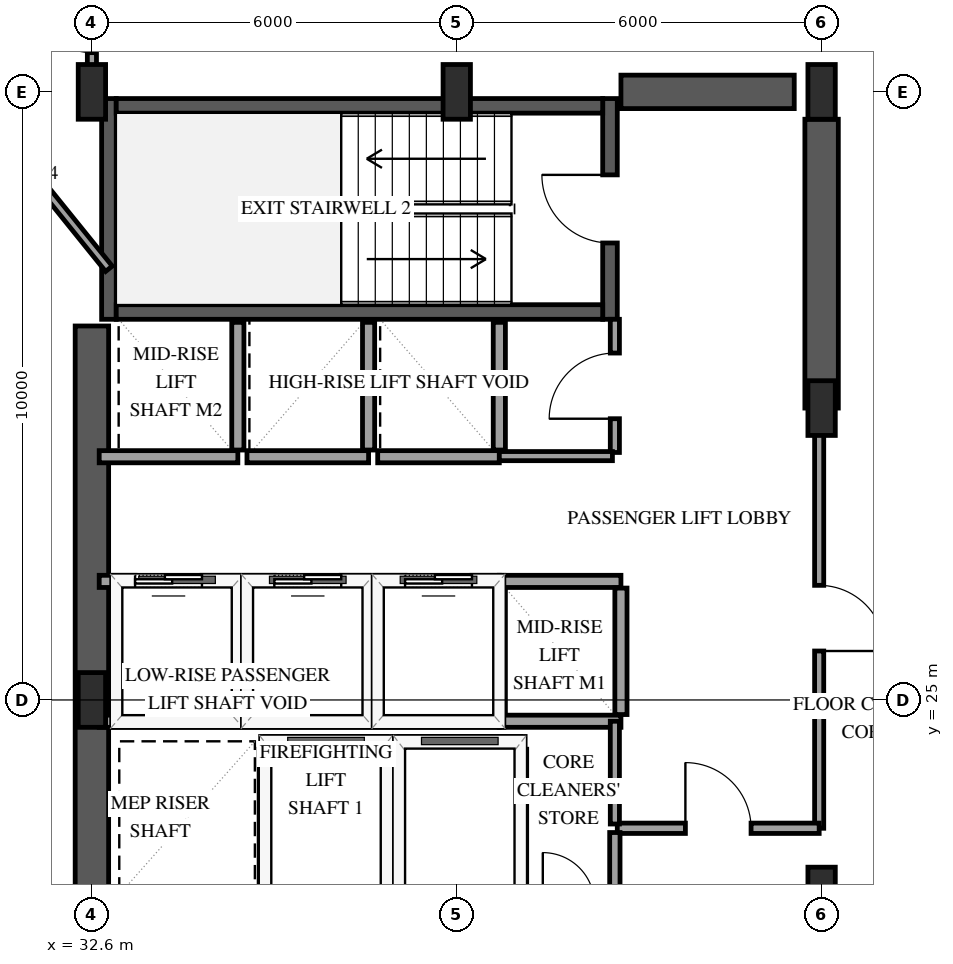
"""IFC4 building model, lengths in metres.
Left out: names, types, materials, properties, quantities, classifications, styles, units other than length and angle.
Written with IfcOpenShell. Run it as: python <this file> out.ifc"""

import sys

from ifc_helpers import new_model, si_unit, direction, frame, frame_2d, origin, origin_2d, place, context, subcontext, project, spatial, rectangle, extrude, element, fill, save


model = new_model("IFC4")
c1 = context("Model", 3, precision=1e-05, world=origin(), true_north=direction((0.0, 1.0)))
c2 = subcontext(c1, "Body", "Model", "MODEL_VIEW")
j1 = project(units=[si_unit("LENGTHUNIT", "METRE"), si_unit("PLANEANGLEUNIT", "RADIAN")], contexts=[c1])
p1 = place(None, origin())
s1 = spatial("IfcSite", under=j1, at=p1, CompositionType="ELEMENT")
p2 = place(p1, origin())
s2 = spatial("IfcBuilding", under=s1, at=p2, CompositionType="ELEMENT")
p3 = place(p2, frame((0.0, 0.0, 130.3)))
s3 = spatial("IfcBuildingStorey", under=s2, at=p3, CompositionType="ELEMENT", Elevation=130.3)
p4 = place(p3, frame((32.88, 31.26, 0.0), z_axis=(0.0, 0.0, 1.0), x_axis=(0.0, 1.0, 0.0)))
e1 = element("IfcWall", 1, at=p4, inside=s3, PredefinedType="SHEAR", context=c2, shape_type="SweptSolid", body=[
    extrude(rectangle(XDim=3.63, YDim=0.24, at=frame_2d((1.815, 0.0))), origin(), (0.0, 0.0, 1.0), 3.9),
])
p5 = place(p3, frame((41.12, 31.26, 0.0), z_axis=(0.0, 0.0, 1.0), x_axis=(0.0, 1.0, 0.0)))
e2 = element("IfcWall", 2, at=p5, inside=s3, PredefinedType="SHEAR", context=c2, shape_type="SweptSolid", body=[
    extrude(rectangle(XDim=3.63, YDim=0.24, at=frame_2d((1.815, 0.0))), origin(), (0.0, 0.0, 1.0), 3.9),
])
p6 = place(p5, frame((1.255, 0.0, 0.0)))
e3 = element("IfcOpeningElement", 3, at=p6, cuts=e2, PredefinedType="OPENING", context=c2, shape_type="SweptSolid", body=[
    extrude(rectangle(XDim=1.12, YDim=2.15, at=frame_2d((0.56, 1.075))), frame((0.0, 0.13, 0.0), z_axis=(0.0, -1.0, 0.0), x_axis=(1.0, 0.0, 0.0)), (0.0, 0.0, 1.0), 0.26),
])
for number, where, z_axis, x_axis in (
    (4, (33.0, 31.38, 0.0), (0.0, 0.0, 1.0), (1.0, 0.0, 0.0)),
    (5, (33.0, 34.77, 0.0), (0.0, 0.0, 1.0), (1.0, 0.0, 0.0)),
):
    element("IfcWall", number, at=place(p3, frame(where, z_axis=z_axis, x_axis=x_axis)), inside=s3, PredefinedType="SHEAR", context=c2, shape_type="SweptSolid", body=[
        extrude(rectangle(XDim=8.0, YDim=0.24, at=frame_2d((4.0, 0.0))), origin(), (0.0, 0.0, 1.0), 3.9),
    ])
p7 = place(p3, frame((32.6, 18.85, 0.0), z_axis=(0.0, 0.0, 1.0), x_axis=(0.0, 1.0, 0.0)))
e6 = element("IfcWall", 6, at=p7, inside=s3, PredefinedType="SHEAR", context=c2, shape_type="SweptSolid", body=[
    extrude(rectangle(XDim=12.3, YDim=0.55, at=frame_2d((6.15, 0.0))), origin(), (0.0, 0.0, 1.0), 3.9),
])
p8 = place(p3, frame((41.3, 35.0, 0.0), z_axis=(0.0, 0.0, 1.0), x_axis=(1.0, 0.0, 0.0)))
e7 = element("IfcWall", 7, at=p8, inside=s3, PredefinedType="SHEAR", context=c2, shape_type="SweptSolid", body=[
    extrude(rectangle(XDim=2.85, YDim=0.55, at=frame_2d((1.425, 0.0))), origin(), (0.0, 0.0, 1.0), 3.9),
])
p9 = place(p3, frame((44.6, 29.8, 0.0), z_axis=(0.0, 0.0, 1.0), x_axis=(0.0, 1.0, 0.0)))
e8 = element("IfcWall", 8, at=p9, inside=s3, PredefinedType="SHEAR", context=c2, shape_type="SweptSolid", body=[
    extrude(rectangle(XDim=4.75, YDim=0.55, at=frame_2d((2.375, 0.0))), origin(), (0.0, 0.0, 1.0), 3.9),
])
for number, where, z_axis, x_axis in (
    (9, (32.6, 25.0, 0.0), (0.0, 0.0, 1.0), (1.0, 0.0, 0.0)),
    (10, (32.6, 35.0, 0.0), (0.0, 0.0, 1.0), (1.0, 0.0, 0.0)),
    (11, (38.6, 35.0, 0.0), (0.0, 0.0, 1.0), (1.0, 0.0, 0.0)),
    (12, (44.6, 21.8, 0.0), (0.0, 0.0, 1.0), (1.0, 0.0, 0.0)),
    (13, (44.6, 29.8, 0.0), (0.0, 0.0, 1.0), (1.0, 0.0, 0.0)),
    (14, (44.6, 35.0, 0.0), (0.0, 0.0, 1.0), (1.0, 0.0, 0.0)),
):
    element("IfcColumn", number, at=place(p3, frame(where, z_axis=z_axis, x_axis=x_axis)), inside=s3, PredefinedType="PILASTER", context=c2, shape_type="SweptSolid", body=[
        extrude(rectangle(XDim=0.45, YDim=0.9, at=origin_2d()), origin(), (0.0, 0.0, 1.0), 3.9),
    ])
p10 = place(p3, frame((35.45, 24.3, 0.0), z_axis=(0.0, 0.0, 1.0), x_axis=(1.0, 0.0, 0.0)))
e15 = element("IfcWall", 15, at=p10, inside=s3, PredefinedType="SOLIDWALL", context=c2, shape_type="SweptSolid", body=[
    extrude(rectangle(XDim=2.0, YDim=0.2, at=frame_2d((1.0, 0.0))), origin(), (0.0, 0.0, 1.0), 3.56),
])
for number, where, z_axis, x_axis in (
    (16, (35.45, 21.81, 0.0), (0.0, 0.0, 1.0), (0.0, 1.0, 0.0)),
    (17, (37.45, 21.81, 0.0), (0.0, 0.0, 1.0), (0.0, 1.0, 0.0)),
):
    element("IfcWall", number, at=place(p3, frame(where, z_axis=z_axis, x_axis=x_axis)), inside=s3, PredefinedType="SOLIDWALL", context=c2, shape_type="SweptSolid", body=[
        extrude(rectangle(XDim=2.38, YDim=0.2, at=frame_2d((1.19, 0.0))), origin(), (0.0, 0.0, 1.0), 3.56),
    ])
p11 = place(p3, frame((37.65, 24.3, 0.0), z_axis=(0.0, 0.0, 1.0), x_axis=(1.0, 0.0, 0.0)))
e18 = element("IfcWall", 18, at=p11, inside=s3, PredefinedType="SOLIDWALL", context=c2, shape_type="SweptSolid", body=[
    extrude(rectangle(XDim=2.0, YDim=0.2, at=frame_2d((1.0, 0.0))), origin(), (0.0, 0.0, 1.0), 3.56),
])
p12 = place(p3, frame((39.65, 21.81, 0.0), z_axis=(0.0, 0.0, 1.0), x_axis=(0.0, 1.0, 0.0)))
e19 = element("IfcWall", 19, at=p12, inside=s3, PredefinedType="SOLIDWALL", context=c2, shape_type="SweptSolid", body=[
    extrude(rectangle(XDim=2.38, YDim=0.2, at=frame_2d((1.19, 0.0))), origin(), (0.0, 0.0, 1.0), 3.56),
])
p13 = place(p3, frame((32.72, 24.65, 0.0), z_axis=(0.0, 0.0, 1.0), x_axis=(1.0, 0.0, 0.0)))
e20 = element("IfcWall", 20, at=p13, inside=s3, PredefinedType="SOLIDWALL", context=c2, shape_type="SweptSolid", body=[
    extrude(rectangle(XDim=2.28, YDim=0.2, at=frame_2d((1.14, 0.0))), origin(), (0.0, 0.0, 1.0), 3.56),
])
p14 = place(p3, frame((32.72, 26.95, 0.0), z_axis=(0.0, 0.0, 1.0), x_axis=(1.0, 0.0, 0.0)))
e21 = element("IfcWall", 21, at=p14, inside=s3, PredefinedType="SOLIDWALL", context=c2, shape_type="SweptSolid", body=[
    extrude(rectangle(XDim=2.28, YDim=0.2, at=frame_2d((1.14, 0.0))), origin(), (0.0, 0.0, 1.0), 3.56),
])
p15 = place(p14, frame((0.59, 0.0, 0.0)))
e22 = element("IfcOpeningElement", 22, at=p15, cuts=e21, PredefinedType="OPENING", context=c2, shape_type="SweptSolid", body=[
    extrude(rectangle(XDim=1.1, YDim=2.15, at=frame_2d((0.55, 1.075))), frame((0.0, 0.11, 0.0), z_axis=(0.0, -1.0, 0.0), x_axis=(1.0, 0.0, 0.0)), (0.0, 0.0, 1.0), 0.22),
])
p16 = place(p3, frame((35.0, 24.76, 0.0), z_axis=(0.0, 0.0, 1.0), x_axis=(0.0, 1.0, 0.0)))
e23 = element("IfcWall", 23, at=p16, inside=s3, PredefinedType="SOLIDWALL", context=c2, shape_type="SweptSolid", body=[
    extrude(rectangle(XDim=2.08, YDim=0.2, at=frame_2d((1.04, 0.0))), origin(), (0.0, 0.0, 1.0), 3.56),
])
p17 = place(p3, frame((35.15, 24.65, 0.0), z_axis=(0.0, 0.0, 1.0), x_axis=(1.0, 0.0, 0.0)))
e24 = element("IfcWall", 24, at=p17, inside=s3, PredefinedType="SOLIDWALL", context=c2, shape_type="SweptSolid", body=[
    extrude(rectangle(XDim=2.0, YDim=0.2, at=frame_2d((1.0, 0.0))), origin(), (0.0, 0.0, 1.0), 3.56),
])
p18 = place(p3, frame((35.15, 26.95, 0.0), z_axis=(0.0, 0.0, 1.0), x_axis=(1.0, 0.0, 0.0)))
e25 = element("IfcWall", 25, at=p18, inside=s3, PredefinedType="SOLIDWALL", context=c2, shape_type="SweptSolid", body=[
    extrude(rectangle(XDim=2.0, YDim=0.2, at=frame_2d((1.0, 0.0))), origin(), (0.0, 0.0, 1.0), 3.56),
])
p19 = place(p18, frame((0.45, 0.0, 0.0)))
e26 = element("IfcOpeningElement", 26, at=p19, cuts=e25, PredefinedType="OPENING", context=c2, shape_type="SweptSolid", body=[
    extrude(rectangle(XDim=1.1, YDim=2.15, at=frame_2d((0.55, 1.075))), frame((0.0, 0.11, 0.0), z_axis=(0.0, -1.0, 0.0), x_axis=(1.0, 0.0, 0.0)), (0.0, 0.0, 1.0), 0.22),
])
p20 = place(p3, frame((37.15, 24.76, 0.0), z_axis=(0.0, 0.0, 1.0), x_axis=(0.0, 1.0, 0.0)))
e27 = element("IfcWall", 27, at=p20, inside=s3, PredefinedType="SOLIDWALL", context=c2, shape_type="SweptSolid", body=[
    extrude(rectangle(XDim=2.08, YDim=0.2, at=frame_2d((1.04, 0.0))), origin(), (0.0, 0.0, 1.0), 3.56),
])
p21 = place(p3, frame((37.3, 24.65, 0.0), z_axis=(0.0, 0.0, 1.0), x_axis=(1.0, 0.0, 0.0)))
e28 = element("IfcWall", 28, at=p21, inside=s3, PredefinedType="SOLIDWALL", context=c2, shape_type="SweptSolid", body=[
    extrude(rectangle(XDim=2.0, YDim=0.2, at=frame_2d((1.0, 0.0))), origin(), (0.0, 0.0, 1.0), 3.56),
])
p22 = place(p3, frame((37.3, 26.95, 0.0), z_axis=(0.0, 0.0, 1.0), x_axis=(1.0, 0.0, 0.0)))
e29 = element("IfcWall", 29, at=p22, inside=s3, PredefinedType="SOLIDWALL", context=c2, shape_type="SweptSolid", body=[
    extrude(rectangle(XDim=2.0, YDim=0.2, at=frame_2d((1.0, 0.0))), origin(), (0.0, 0.0, 1.0), 3.56),
])
p23 = place(p22, frame((0.45, 0.0, 0.0)))
e30 = element("IfcOpeningElement", 30, at=p23, cuts=e29, PredefinedType="OPENING", context=c2, shape_type="SweptSolid", body=[
    extrude(rectangle(XDim=1.1, YDim=2.15, at=frame_2d((0.55, 1.075))), frame((0.0, 0.11, 0.0), z_axis=(0.0, -1.0, 0.0), x_axis=(1.0, 0.0, 0.0)), (0.0, 0.0, 1.0), 0.22),
])
p24 = place(p3, frame((39.3, 24.76, 0.0), z_axis=(0.0, 0.0, 1.0), x_axis=(0.0, 1.0, 0.0)))
e31 = element("IfcWall", 31, at=p24, inside=s3, PredefinedType="SOLIDWALL", context=c2, shape_type="SweptSolid", body=[
    extrude(rectangle(XDim=2.08, YDim=0.2, at=frame_2d((1.04, 0.0))), origin(), (0.0, 0.0, 1.0), 3.56),
])
for number, where, z_axis, x_axis in (
    (32, (39.3, 24.65, 0.0), (0.0, 0.0, 1.0), (1.0, 0.0, 0.0)),
    (33, (39.3, 26.95, 0.0), (0.0, 0.0, 1.0), (1.0, 0.0, 0.0)),
):
    element("IfcWall", number, at=place(p3, frame(where, z_axis=z_axis, x_axis=x_axis)), inside=s3, PredefinedType="SOLIDWALL", context=c2, shape_type="SweptSolid", body=[
        extrude(rectangle(XDim=2.0, YDim=0.2, at=frame_2d((1.0, 0.0))), origin(), (0.0, 0.0, 1.0), 3.56),
    ])
p25 = place(p3, frame((41.3, 24.76, 0.0), z_axis=(0.0, 0.0, 1.0), x_axis=(0.0, 1.0, 0.0)))
e34 = element("IfcWall", 34, at=p25, inside=s3, PredefinedType="SOLIDWALL", context=c2, shape_type="SweptSolid", body=[
    extrude(rectangle(XDim=2.08, YDim=0.2, at=frame_2d((1.04, 0.0))), origin(), (0.0, 0.0, 1.0), 3.56),
])
p26 = place(p3, frame((32.72, 29.0, 0.0), z_axis=(0.0, 0.0, 1.0), x_axis=(1.0, 0.0, 0.0)))
e35 = element("IfcWall", 35, at=p26, inside=s3, PredefinedType="SOLIDWALL", context=c2, shape_type="SweptSolid", body=[
    extrude(rectangle(XDim=2.28, YDim=0.2, at=frame_2d((1.14, 0.0))), origin(), (0.0, 0.0, 1.0), 3.56),
])
p27 = place(p3, frame((35.0, 29.11, 0.0), z_axis=(0.0, 0.0, 1.0), x_axis=(0.0, 1.0, 0.0)))
e36 = element("IfcWall", 36, at=p27, inside=s3, PredefinedType="SOLIDWALL", context=c2, shape_type="SweptSolid", body=[
    extrude(rectangle(XDim=2.1, YDim=0.2, at=frame_2d((1.05, 0.0))), origin(), (0.0, 0.0, 1.0), 3.56),
])
p28 = place(p3, frame((35.15, 29.0, 0.0), z_axis=(0.0, 0.0, 1.0), x_axis=(1.0, 0.0, 0.0)))
e37 = element("IfcWall", 37, at=p28, inside=s3, PredefinedType="SOLIDWALL", context=c2, shape_type="SweptSolid", body=[
    extrude(rectangle(XDim=2.0, YDim=0.2, at=frame_2d((1.0, 0.0))), origin(), (0.0, 0.0, 1.0), 3.56),
])
p29 = place(p3, frame((37.15, 29.11, 0.0), z_axis=(0.0, 0.0, 1.0), x_axis=(0.0, 1.0, 0.0)))
e38 = element("IfcWall", 38, at=p29, inside=s3, PredefinedType="SOLIDWALL", context=c2, shape_type="SweptSolid", body=[
    extrude(rectangle(XDim=2.1, YDim=0.2, at=frame_2d((1.05, 0.0))), origin(), (0.0, 0.0, 1.0), 3.56),
])
p30 = place(p3, frame((37.3, 29.0, 0.0), z_axis=(0.0, 0.0, 1.0), x_axis=(1.0, 0.0, 0.0)))
e39 = element("IfcWall", 39, at=p30, inside=s3, PredefinedType="SOLIDWALL", context=c2, shape_type="SweptSolid", body=[
    extrude(rectangle(XDim=2.0, YDim=0.2, at=frame_2d((1.0, 0.0))), origin(), (0.0, 0.0, 1.0), 3.56),
])
p31 = place(p3, frame((39.3, 29.11, 0.0), z_axis=(0.0, 0.0, 1.0), x_axis=(0.0, 1.0, 0.0)))
e40 = element("IfcWall", 40, at=p31, inside=s3, PredefinedType="SOLIDWALL", context=c2, shape_type="SweptSolid", body=[
    extrude(rectangle(XDim=2.1, YDim=0.2, at=frame_2d((1.05, 0.0))), origin(), (0.0, 0.0, 1.0), 3.56),
])
p32 = place(p3, frame((44.56, 29.8, 0.0), z_axis=(0.0, 0.0, 1.0), x_axis=(0.0, -1.0, 0.0)))
e41 = element("IfcWall", 41, at=p32, inside=s3, PredefinedType="PARTITIONING", context=c2, shape_type="SweptSolid", body=[
    extrude(rectangle(XDim=6.91, YDim=0.15, at=frame_2d((3.455, 0.0))), origin(), (0.0, 0.0, 1.0), 2.6),
])
p33 = place(p32, frame((2.915, 0.0, 0.0)))
e42 = element("IfcOpeningElement", 42, at=p33, cuts=e41, PredefinedType="OPENING", context=c2, shape_type="SweptSolid", body=[
    extrude(rectangle(XDim=1.08, YDim=2.15, at=frame_2d((0.54, 1.075))), frame((0.0, 0.085, 0.0), z_axis=(0.0, -1.0, 0.0), x_axis=(1.0, 0.0, 0.0)), (0.0, 0.0, 1.0), 0.17),
])
p34 = place(p3, frame((32.88, 32.091, 0.0), z_axis=(0.0, 0.0, 1.0), x_axis=(-0.627971930716, 0.77823598878, 0.0)))
e43 = element("IfcWall", 43, at=p34, inside=s3, PredefinedType="PARTITIONING", context=c2, shape_type="SweptSolid", body=[
    extrude(rectangle(XDim=4.0, YDim=0.14, at=frame_2d((2.0, 0.0))), origin(), (0.0, 0.0, 1.0), 3.56),
])
p35 = place(p3, frame((41.24, 22.89, 0.0), z_axis=(0.0, 0.0, 1.0), x_axis=(1.0, 0.0, 0.0)))
e44 = element("IfcWall", 44, at=p35, inside=s3, PredefinedType="PARTITIONING", context=c2, shape_type="SweptSolid", body=[
    extrude(rectangle(XDim=3.32, YDim=0.17, at=frame_2d((1.66, 0.0))), origin(), (0.0, 0.0, 1.0), 3.56),
])
p36 = place(p35, frame((1.12, 0.0, 0.0)))
e45 = element("IfcOpeningElement", 45, at=p36, cuts=e44, PredefinedType="OPENING", context=c2, shape_type="SweptSolid", body=[
    extrude(rectangle(XDim=1.08, YDim=2.15, at=frame_2d((0.54, 1.075))), frame((0.0, 0.095, 0.0), z_axis=(0.0, -1.0, 0.0), x_axis=(1.0, 0.0, 0.0)), (0.0, 0.0, 1.0), 0.19),
])
p37 = place(p3, frame((41.2, 29.07, 0.0), z_axis=(0.0, 0.0, 1.0), x_axis=(0.0, 1.0, 0.0)))
e46 = element("IfcWall", 46, at=p37, inside=s3, PredefinedType="PARTITIONING", context=c2, shape_type="SweptSolid", body=[
    extrude(rectangle(XDim=2.19, YDim=0.15, at=frame_2d((1.095, 0.0))), origin(), (0.0, 0.0, 1.0), 3.56),
])
p38 = place(p37, frame((0.555, 0.0, 0.0)))
e47 = element("IfcOpeningElement", 47, at=p38, cuts=e46, PredefinedType="OPENING", context=c2, shape_type="SweptSolid", body=[
    extrude(rectangle(XDim=1.08, YDim=2.15, at=frame_2d((0.54, 1.075))), frame((0.0, 0.085, 0.0), z_axis=(0.0, -1.0, 0.0), x_axis=(1.0, 0.0, 0.0)), (0.0, 0.0, 1.0), 0.17),
])
p39 = place(p3, frame((32.6, 35.07, 0.0), z_axis=(0.0, 0.0, 1.0), x_axis=(0.0, 1.0, 0.0)))
e48 = element("IfcWall", 48, at=p39, inside=s3, PredefinedType="PARTITIONING", context=c2, shape_type="SweptSolid", body=[
    extrude(rectangle(XDim=1.91, YDim=0.15, at=frame_2d((0.955, 0.0))), origin(), (0.0, 0.0, 1.0), 3.56),
])
p40 = place(p39, frame((0.575, 0.0, 0.0)))
e49 = element("IfcOpeningElement", 49, at=p40, cuts=e48, PredefinedType="OPENING", context=c2, shape_type="SweptSolid", body=[
    extrude(rectangle(XDim=0.92, YDim=2.12, at=frame_2d((0.46, 1.06))), frame((0.0, 0.085, 0.0), z_axis=(0.0, -1.0, 0.0), x_axis=(1.0, 0.0, 0.0)), (0.0, 0.0, 1.0), 0.17),
])
p41 = place(p3, frame((39.3, 29.01, 0.0), z_axis=(0.0, 0.0, 1.0), x_axis=(1.0, 0.0, 0.0)))
e50 = element("IfcWall", 50, at=p41, inside=s3, PredefinedType="PARTITIONING", context=c2, shape_type="SweptSolid", body=[
    extrude(rectangle(XDim=1.86, YDim=0.15, at=frame_2d((0.93, 0.0))), origin(), (0.0, 0.0, 1.0), 3.56),
])
p42 = place(p3, frame((41.2, 22.96, 0.0), z_axis=(0.0, 0.0, 1.0), x_axis=(0.0, 1.0, 0.0)))
e51 = element("IfcWall", 51, at=p42, inside=s3, PredefinedType="PARTITIONING", context=c2, shape_type="SweptSolid", body=[
    extrude(rectangle(XDim=1.69, YDim=0.15, at=frame_2d((0.845, 0.0))), origin(), (0.0, 0.0, 1.0), 3.56),
])
p43 = place(p3, frame((41.2, 21.7, 0.0), z_axis=(0.0, 0.0, 1.0), x_axis=(0.0, 1.0, 0.0)))
e52 = element("IfcWall", 52, at=p43, inside=s3, PredefinedType="PARTITIONING", context=c2, shape_type="SweptSolid", body=[
    extrude(rectangle(XDim=1.12, YDim=0.17, at=frame_2d((0.56, 0.0))), origin(), (0.0, 0.0, 1.0), 3.56),
])
p44 = place(p15, origin())
e53 = element("IfcDoor", 53, at=p44, inside=s3, OperationType="SLIDING_TO_LEFT", PredefinedType="DOOR", context=c2, shape_type="SweptSolid", body=[
    extrude(rectangle(XDim=1.1, YDim=2.15, at=frame_2d((0.55, 1.075))), frame((0.0, 0.025, 0.0), z_axis=(0.0, -1.0, 0.0), x_axis=(1.0, 0.0, 0.0)), (0.0, 0.0, 1.0), 0.05),
])
fill(e22, e53)
p45 = place(p19, origin())
e54 = element("IfcDoor", 54, at=p45, inside=s3, OperationType="SLIDING_TO_LEFT", PredefinedType="DOOR", context=c2, shape_type="SweptSolid", body=[
    extrude(rectangle(XDim=1.1, YDim=2.15, at=frame_2d((0.55, 1.075))), frame((0.0, 0.025, 0.0), z_axis=(0.0, -1.0, 0.0), x_axis=(1.0, 0.0, 0.0)), (0.0, 0.0, 1.0), 0.05),
])
fill(e26, e54)
p46 = place(p23, origin())
e55 = element("IfcDoor", 55, at=p46, inside=s3, OperationType="SLIDING_TO_LEFT", PredefinedType="DOOR", context=c2, shape_type="SweptSolid", body=[
    extrude(rectangle(XDim=1.1, YDim=2.15, at=frame_2d((0.55, 1.075))), frame((0.0, 0.025, 0.0), z_axis=(0.0, -1.0, 0.0), x_axis=(1.0, 0.0, 0.0)), (0.0, 0.0, 1.0), 0.05),
])
fill(e30, e55)
p47 = place(p6, origin())
e56 = element("IfcDoor", 56, at=p47, inside=s3, OperationType="SINGLE_SWING_RIGHT", PredefinedType="DOOR", context=c2, shape_type="SweptSolid", body=[
    extrude(rectangle(XDim=1.12, YDim=2.15, at=frame_2d((0.56, 1.075))), frame((0.0, 0.025, 0.0), z_axis=(0.0, -1.0, 0.0), x_axis=(1.0, 0.0, 0.0)), (0.0, 0.0, 1.0), 0.05),
])
fill(e3, e56)
p48 = place(p33, origin())
e57 = element("IfcDoor", 57, at=p48, inside=s3, OperationType="SINGLE_SWING_RIGHT", PredefinedType="DOOR", context=c2, shape_type="SweptSolid", body=[
    extrude(rectangle(XDim=1.08, YDim=2.15, at=frame_2d((0.54, 1.075))), frame((0.0, 0.025, 0.0), z_axis=(0.0, -1.0, 0.0), x_axis=(1.0, 0.0, 0.0)), (0.0, 0.0, 1.0), 0.05),
])
fill(e42, e57)
p49 = place(p36, origin())
e58 = element("IfcDoor", 58, at=p49, inside=s3, OperationType="SINGLE_SWING_LEFT", PredefinedType="DOOR", context=c2, shape_type="SweptSolid", body=[
    extrude(rectangle(XDim=1.08, YDim=2.15, at=frame_2d((0.54, 1.075))), frame((0.0, 0.025, 0.0), z_axis=(0.0, -1.0, 0.0), x_axis=(1.0, 0.0, 0.0)), (0.0, 0.0, 1.0), 0.05),
])
fill(e45, e58)
p50 = place(p38, origin())
e59 = element("IfcDoor", 59, at=p50, inside=s3, OperationType="SINGLE_SWING_LEFT", PredefinedType="DOOR", context=c2, shape_type="SweptSolid", body=[
    extrude(rectangle(XDim=1.08, YDim=2.15, at=frame_2d((0.54, 1.075))), frame((0.0, 0.025, 0.0), z_axis=(0.0, -1.0, 0.0), x_axis=(1.0, 0.0, 0.0)), (0.0, 0.0, 1.0), 0.05),
])
fill(e47, e59)
p51 = place(p40, origin())
e60 = element("IfcDoor", 60, at=p51, inside=s3, OperationType="SINGLE_SWING_RIGHT", PredefinedType="DOOR", context=c2, shape_type="SweptSolid", body=[
    extrude(rectangle(XDim=0.92, YDim=2.12, at=frame_2d((0.46, 1.06))), frame((0.0, 0.025, 0.0), z_axis=(0.0, -1.0, 0.0), x_axis=(1.0, 0.0, 0.0)), (0.0, 0.0, 1.0), 0.05),
])
fill(e49, e60)
save(model, sys.argv[1])
